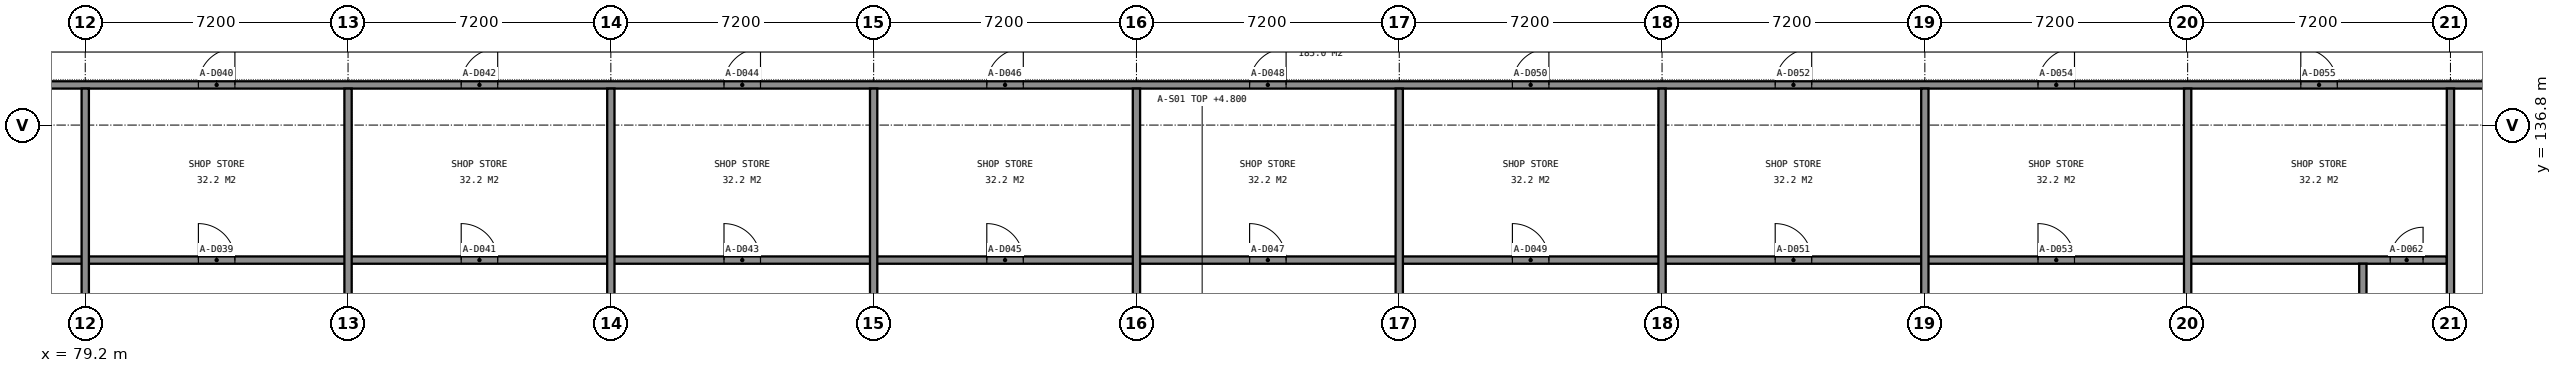
"""IFC4 building model, lengths in metres.
Left out: names, types, materials, properties, quantities, classifications, styles, units other than length and angle.
Written with IfcOpenShell. Run it as: python <this file> out.ifc"""

import sys

from ifc_helpers import new_model, si_unit, direction, frame, frame_2d, origin, place, context, subcontext, project, spatial, rectangle, extrude, element, fill, save


model = new_model("IFC4")
c1 = context("Model", 3, precision=1e-05, world=origin(), true_north=direction((0.0, 1.0)))
c2 = subcontext(c1, "Body", "Model", "MODEL_VIEW")
j1 = project(units=[si_unit("LENGTHUNIT", "METRE"), si_unit("PLANEANGLEUNIT", "RADIAN")], contexts=[c1])
p1 = place(None, origin())
s1 = spatial("IfcSite", under=j1, at=p1, CompositionType="ELEMENT")
p2 = place(p1, origin())
s2 = spatial("IfcBuilding", under=s1, at=p2, CompositionType="ELEMENT")
p3 = place(p2, origin())
s3 = spatial("IfcBuildingStorey", under=s2, at=p3, CompositionType="ELEMENT", Elevation=0.0)
p4 = place(p3, frame((57.7, 133.1, 0.0), z_axis=(0.0, 0.0, 1.0), x_axis=(1.0, 0.0, 0.0)))
e1 = element("IfcWall", 1, at=p4, inside=s3, PredefinedType="PARTITIONING", context=c2, shape_type="SweptSolid", body=[
    extrude(rectangle(XDim=86.2, YDim=0.2, at=frame_2d((43.1, 0.0))), origin(), (0.0, 0.0, 1.0), 3.5),
])
p5 = place(p4, frame((3.0, 0.0, 0.0)))
e2 = element("IfcOpeningElement", 2, at=p5, cuts=e1, PredefinedType="OPENING", context=c2, shape_type="SweptSolid", body=[
    extrude(rectangle(XDim=1.0, YDim=2.1, at=frame_2d((0.5, 1.05))), frame((0.0, 0.11, 0.0), z_axis=(0.0, -1.0, 0.0), x_axis=(1.0, 0.0, 0.0)), (0.0, 0.0, 1.0), 0.22),
])
p6 = place(p4, frame((10.2, 0.0, 0.0)))
e3 = element("IfcOpeningElement", 3, at=p6, cuts=e1, PredefinedType="OPENING", context=c2, shape_type="SweptSolid", body=[
    extrude(rectangle(XDim=1.0, YDim=2.1, at=frame_2d((0.5, 1.05))), frame((0.0, 0.11, 0.0), z_axis=(0.0, -1.0, 0.0), x_axis=(1.0, 0.0, 0.0)), (0.0, 0.0, 1.0), 0.22),
])
p7 = place(p4, frame((17.4, 0.0, 0.0)))
e4 = element("IfcOpeningElement", 4, at=p7, cuts=e1, PredefinedType="OPENING", context=c2, shape_type="SweptSolid", body=[
    extrude(rectangle(XDim=1.0, YDim=2.1, at=frame_2d((0.5, 1.05))), frame((0.0, 0.11, 0.0), z_axis=(0.0, -1.0, 0.0), x_axis=(1.0, 0.0, 0.0)), (0.0, 0.0, 1.0), 0.22),
])
p8 = place(p4, frame((24.6, 0.0, 0.0)))
e5 = element("IfcOpeningElement", 5, at=p8, cuts=e1, PredefinedType="OPENING", context=c2, shape_type="SweptSolid", body=[
    extrude(rectangle(XDim=1.0, YDim=2.1, at=frame_2d((0.5, 1.05))), frame((0.0, 0.11, 0.0), z_axis=(0.0, -1.0, 0.0), x_axis=(1.0, 0.0, 0.0)), (0.0, 0.0, 1.0), 0.22),
])
p9 = place(p4, frame((31.8, 0.0, 0.0)))
e6 = element("IfcOpeningElement", 6, at=p9, cuts=e1, PredefinedType="OPENING", context=c2, shape_type="SweptSolid", body=[
    extrude(rectangle(XDim=1.0, YDim=2.1, at=frame_2d((0.5, 1.05))), frame((0.0, 0.11, 0.0), z_axis=(0.0, -1.0, 0.0), x_axis=(1.0, 0.0, 0.0)), (0.0, 0.0, 1.0), 0.22),
])
p10 = place(p4, frame((39.0, 0.0, 0.0)))
e7 = element("IfcOpeningElement", 7, at=p10, cuts=e1, PredefinedType="OPENING", context=c2, shape_type="SweptSolid", body=[
    extrude(rectangle(XDim=1.0, YDim=2.1, at=frame_2d((0.5, 1.05))), frame((0.0, 0.11, 0.0), z_axis=(0.0, -1.0, 0.0), x_axis=(1.0, 0.0, 0.0)), (0.0, 0.0, 1.0), 0.22),
])
p11 = place(p4, frame((46.2, 0.0, 0.0)))
e8 = element("IfcOpeningElement", 8, at=p11, cuts=e1, PredefinedType="OPENING", context=c2, shape_type="SweptSolid", body=[
    extrude(rectangle(XDim=1.0, YDim=2.1, at=frame_2d((0.5, 1.05))), frame((0.0, 0.11, 0.0), z_axis=(0.0, -1.0, 0.0), x_axis=(1.0, 0.0, 0.0)), (0.0, 0.0, 1.0), 0.22),
])
p12 = place(p4, frame((53.4, 0.0, 0.0)))
e9 = element("IfcOpeningElement", 9, at=p12, cuts=e1, PredefinedType="OPENING", context=c2, shape_type="SweptSolid", body=[
    extrude(rectangle(XDim=1.0, YDim=2.1, at=frame_2d((0.5, 1.05))), frame((0.0, 0.11, 0.0), z_axis=(0.0, -1.0, 0.0), x_axis=(1.0, 0.0, 0.0)), (0.0, 0.0, 1.0), 0.22),
])
p13 = place(p4, frame((60.6, 0.0, 0.0)))
e10 = element("IfcOpeningElement", 10, at=p13, cuts=e1, PredefinedType="OPENING", context=c2, shape_type="SweptSolid", body=[
    extrude(rectangle(XDim=1.0, YDim=2.1, at=frame_2d((0.5, 1.05))), frame((0.0, 0.11, 0.0), z_axis=(0.0, -1.0, 0.0), x_axis=(1.0, 0.0, 0.0)), (0.0, 0.0, 1.0), 0.22),
])
p14 = place(p4, frame((67.8, 0.0, 0.0)))
e11 = element("IfcOpeningElement", 11, at=p14, cuts=e1, PredefinedType="OPENING", context=c2, shape_type="SweptSolid", body=[
    extrude(rectangle(XDim=1.0, YDim=2.1, at=frame_2d((0.5, 1.05))), frame((0.0, 0.11, 0.0), z_axis=(0.0, -1.0, 0.0), x_axis=(1.0, 0.0, 0.0)), (0.0, 0.0, 1.0), 0.22),
])
p15 = place(p4, frame((75.0, 0.0, 0.0)))
e12 = element("IfcOpeningElement", 12, at=p15, cuts=e1, PredefinedType="OPENING", context=c2, shape_type="SweptSolid", body=[
    extrude(rectangle(XDim=1.0, YDim=2.1, at=frame_2d((0.5, 1.05))), frame((0.0, 0.11, 0.0), z_axis=(0.0, -1.0, 0.0), x_axis=(1.0, 0.0, 0.0)), (0.0, 0.0, 1.0), 0.22),
])
p16 = place(p4, frame((84.65, 0.0, 0.0)))
e13 = element("IfcOpeningElement", 13, at=p16, cuts=e1, PredefinedType="OPENING", context=c2, shape_type="SweptSolid", body=[
    extrude(rectangle(XDim=0.9, YDim=2.1, at=frame_2d((0.45, 1.05))), frame((0.0, 0.11, 0.0), z_axis=(0.0, -1.0, 0.0), x_axis=(1.0, 0.0, 0.0)), (0.0, 0.0, 1.0), 0.22),
])
p17 = place(p3, frame((54.35, 137.9, 0.0), z_axis=(0.0, 0.0, 1.0), x_axis=(1.0, 0.0, 0.0)))
e14 = element("IfcWall", 14, at=p17, inside=s3, PredefinedType="PARTITIONING", context=c2, shape_type="SweptSolid", body=[
    extrude(rectangle(XDim=92.9, YDim=0.2, at=frame_2d((46.45, 0.0))), origin(), (0.0, 0.0, 1.0), 3.5),
])
p18 = place(p17, frame((1.1, 0.0, 0.0)))
e15 = element("IfcOpeningElement", 15, at=p18, cuts=e14, PredefinedType="OPENING", context=c2, shape_type="SweptSolid", body=[
    extrude(rectangle(XDim=0.9, YDim=2.1, at=frame_2d((0.45, 1.05))), frame((0.0, 0.11, 0.0), z_axis=(0.0, -1.0, 0.0), x_axis=(1.0, 0.0, 0.0)), (0.0, 0.0, 1.0), 0.22),
])
p19 = place(p17, frame((90.9, 0.0, 0.0)))
e16 = element("IfcOpeningElement", 16, at=p19, cuts=e14, PredefinedType="OPENING", context=c2, shape_type="SweptSolid", body=[
    extrude(rectangle(XDim=0.9, YDim=2.1, at=frame_2d((0.45, 1.05))), frame((0.0, 0.11, 0.0), z_axis=(0.0, -1.0, 0.0), x_axis=(1.0, 0.0, 0.0)), (0.0, 0.0, 1.0), 0.22),
])
p20 = place(p17, frame((6.35, 0.0, 0.0)))
e17 = element("IfcOpeningElement", 17, at=p20, cuts=e14, PredefinedType="OPENING", context=c2, shape_type="SweptSolid", body=[
    extrude(rectangle(XDim=1.0, YDim=2.1, at=frame_2d((0.5, 1.05))), frame((0.0, 0.11, 0.0), z_axis=(0.0, -1.0, 0.0), x_axis=(1.0, 0.0, 0.0)), (0.0, 0.0, 1.0), 0.22),
])
p21 = place(p17, frame((13.55, 0.0, 0.0)))
e18 = element("IfcOpeningElement", 18, at=p21, cuts=e14, PredefinedType="OPENING", context=c2, shape_type="SweptSolid", body=[
    extrude(rectangle(XDim=1.0, YDim=2.1, at=frame_2d((0.5, 1.05))), frame((0.0, 0.11, 0.0), z_axis=(0.0, -1.0, 0.0), x_axis=(1.0, 0.0, 0.0)), (0.0, 0.0, 1.0), 0.22),
])
p22 = place(p17, frame((20.75, 0.0, 0.0)))
e19 = element("IfcOpeningElement", 19, at=p22, cuts=e14, PredefinedType="OPENING", context=c2, shape_type="SweptSolid", body=[
    extrude(rectangle(XDim=1.0, YDim=2.1, at=frame_2d((0.5, 1.05))), frame((0.0, 0.11, 0.0), z_axis=(0.0, -1.0, 0.0), x_axis=(1.0, 0.0, 0.0)), (0.0, 0.0, 1.0), 0.22),
])
p23 = place(p17, frame((27.95, 0.0, 0.0)))
e20 = element("IfcOpeningElement", 20, at=p23, cuts=e14, PredefinedType="OPENING", context=c2, shape_type="SweptSolid", body=[
    extrude(rectangle(XDim=1.0, YDim=2.1, at=frame_2d((0.5, 1.05))), frame((0.0, 0.11, 0.0), z_axis=(0.0, -1.0, 0.0), x_axis=(1.0, 0.0, 0.0)), (0.0, 0.0, 1.0), 0.22),
])
p24 = place(p17, frame((35.15, 0.0, 0.0)))
e21 = element("IfcOpeningElement", 21, at=p24, cuts=e14, PredefinedType="OPENING", context=c2, shape_type="SweptSolid", body=[
    extrude(rectangle(XDim=1.0, YDim=2.1, at=frame_2d((0.5, 1.05))), frame((0.0, 0.11, 0.0), z_axis=(0.0, -1.0, 0.0), x_axis=(1.0, 0.0, 0.0)), (0.0, 0.0, 1.0), 0.22),
])
p25 = place(p17, frame((42.35, 0.0, 0.0)))
e22 = element("IfcOpeningElement", 22, at=p25, cuts=e14, PredefinedType="OPENING", context=c2, shape_type="SweptSolid", body=[
    extrude(rectangle(XDim=1.0, YDim=2.1, at=frame_2d((0.5, 1.05))), frame((0.0, 0.11, 0.0), z_axis=(0.0, -1.0, 0.0), x_axis=(1.0, 0.0, 0.0)), (0.0, 0.0, 1.0), 0.22),
])
p26 = place(p17, frame((49.55, 0.0, 0.0)))
e23 = element("IfcOpeningElement", 23, at=p26, cuts=e14, PredefinedType="OPENING", context=c2, shape_type="SweptSolid", body=[
    extrude(rectangle(XDim=1.0, YDim=2.1, at=frame_2d((0.5, 1.05))), frame((0.0, 0.11, 0.0), z_axis=(0.0, -1.0, 0.0), x_axis=(1.0, 0.0, 0.0)), (0.0, 0.0, 1.0), 0.22),
])
p27 = place(p17, frame((56.75, 0.0, 0.0)))
e24 = element("IfcOpeningElement", 24, at=p27, cuts=e14, PredefinedType="OPENING", context=c2, shape_type="SweptSolid", body=[
    extrude(rectangle(XDim=1.0, YDim=2.1, at=frame_2d((0.5, 1.05))), frame((0.0, 0.11, 0.0), z_axis=(0.0, -1.0, 0.0), x_axis=(1.0, 0.0, 0.0)), (0.0, 0.0, 1.0), 0.22),
])
p28 = place(p17, frame((63.95, 0.0, 0.0)))
e25 = element("IfcOpeningElement", 25, at=p28, cuts=e14, PredefinedType="OPENING", context=c2, shape_type="SweptSolid", body=[
    extrude(rectangle(XDim=1.0, YDim=2.1, at=frame_2d((0.5, 1.05))), frame((0.0, 0.11, 0.0), z_axis=(0.0, -1.0, 0.0), x_axis=(1.0, 0.0, 0.0)), (0.0, 0.0, 1.0), 0.22),
])
p29 = place(p17, frame((71.15, 0.0, 0.0)))
e26 = element("IfcOpeningElement", 26, at=p29, cuts=e14, PredefinedType="OPENING", context=c2, shape_type="SweptSolid", body=[
    extrude(rectangle(XDim=1.0, YDim=2.1, at=frame_2d((0.5, 1.05))), frame((0.0, 0.11, 0.0), z_axis=(0.0, -1.0, 0.0), x_axis=(1.0, 0.0, 0.0)), (0.0, 0.0, 1.0), 0.22),
])
p30 = place(p17, frame((78.35, 0.0, 0.0)))
e27 = element("IfcOpeningElement", 27, at=p30, cuts=e14, PredefinedType="OPENING", context=c2, shape_type="SweptSolid", body=[
    extrude(rectangle(XDim=1.0, YDim=2.1, at=frame_2d((0.5, 1.05))), frame((0.0, 0.11, 0.0), z_axis=(0.0, -1.0, 0.0), x_axis=(1.0, 0.0, 0.0)), (0.0, 0.0, 1.0), 0.22),
])
p31 = place(p17, frame((85.55, 0.0, 0.0)))
e28 = element("IfcOpeningElement", 28, at=p31, cuts=e14, PredefinedType="OPENING", context=c2, shape_type="SweptSolid", body=[
    extrude(rectangle(XDim=1.0, YDim=2.1, at=frame_2d((0.5, 1.05))), frame((0.0, 0.11, 0.0), z_axis=(0.0, -1.0, 0.0), x_axis=(1.0, 0.0, 0.0)), (0.0, 0.0, 1.0), 0.22),
])
for number, where, z_axis, x_axis in (
    (29, (79.2, 129.85, 0.0), (0.0, 0.0, 1.0), (0.0, 1.0, 0.0)),
    (30, (86.4, 129.85, 0.0), (0.0, 0.0, 1.0), (0.0, 1.0, 0.0)),
    (31, (93.6, 129.85, 0.0), (0.0, 0.0, 1.0), (0.0, 1.0, 0.0)),
    (32, (100.8, 129.85, 0.0), (0.0, 0.0, 1.0), (0.0, 1.0, 0.0)),
    (33, (108.0, 129.85, 0.0), (0.0, 0.0, 1.0), (0.0, 1.0, 0.0)),
    (34, (115.2, 129.85, 0.0), (0.0, 0.0, 1.0), (0.0, 1.0, 0.0)),
    (35, (122.4, 129.85, 0.0), (0.0, 0.0, 1.0), (0.0, 1.0, 0.0)),
    (36, (129.6, 129.85, 0.0), (0.0, 0.0, 1.0), (0.0, 1.0, 0.0)),
    (37, (136.8, 129.85, 0.0), (0.0, 0.0, 1.0), (0.0, 1.0, 0.0)),
):
    element("IfcWall", number, at=place(p3, frame(where, z_axis=z_axis, x_axis=x_axis)), inside=s3, PredefinedType="PARTITIONING", context=c2, shape_type="SweptSolid", body=[
        extrude(rectangle(XDim=7.95, YDim=0.2, at=frame_2d((3.975, 0.0))), origin(), (0.0, 0.0, 1.0), 3.5),
    ])
p32 = place(p3, frame((141.6, 123.7, 0.0), z_axis=(0.0, 0.0, 1.0), x_axis=(0.0, 1.0, 0.0)))
e38 = element("IfcWall", 38, at=p32, inside=s3, PredefinedType="PARTITIONING", context=c2, shape_type="SweptSolid", body=[
    extrude(rectangle(XDim=9.3, YDim=0.2, at=frame_2d((4.65, 0.0))), origin(), (0.0, 0.0, 1.0), 3.5),
])
p33 = place(p3, frame((144.0, 129.85, 0.0), z_axis=(0.0, 0.0, 1.0), x_axis=(0.0, 1.0, 0.0)))
e39 = element("IfcWall", 39, at=p33, inside=s3, PredefinedType="PARTITIONING", context=c2, shape_type="SweptSolid", body=[
    extrude(rectangle(XDim=7.95, YDim=0.2, at=frame_2d((3.975, 0.0))), origin(), (0.0, 0.0, 1.0), 3.5),
])
p34 = place(p8, origin())
e40 = element("IfcDoor", 40, at=p34, inside=s3, OperationType="SINGLE_SWING_LEFT", PredefinedType="DOOR", context=c2, shape_type="SweptSolid", body=[
    extrude(rectangle(XDim=1.0, YDim=2.1, at=frame_2d((0.5, 1.05))), frame((0.0, 0.025, 0.0), z_axis=(0.0, -1.0, 0.0), x_axis=(1.0, 0.0, 0.0)), (0.0, 0.0, 1.0), 0.05),
])
fill(e5, e40)
p35 = place(p23, origin())
e41 = element("IfcDoor", 41, at=p35, inside=s3, OperationType="SINGLE_SWING_RIGHT", PredefinedType="DOOR", context=c2, shape_type="SweptSolid", body=[
    extrude(rectangle(XDim=1.0, YDim=2.1, at=frame_2d((0.5, 1.05))), frame((0.0, 0.025, 0.0), z_axis=(0.0, -1.0, 0.0), x_axis=(1.0, 0.0, 0.0)), (0.0, 0.0, 1.0), 0.05),
])
fill(e20, e41)
p36 = place(p9, origin())
e42 = element("IfcDoor", 42, at=p36, inside=s3, OperationType="SINGLE_SWING_LEFT", PredefinedType="DOOR", context=c2, shape_type="SweptSolid", body=[
    extrude(rectangle(XDim=1.0, YDim=2.1, at=frame_2d((0.5, 1.05))), frame((0.0, 0.025, 0.0), z_axis=(0.0, -1.0, 0.0), x_axis=(1.0, 0.0, 0.0)), (0.0, 0.0, 1.0), 0.05),
])
fill(e6, e42)
p37 = place(p24, origin())
e43 = element("IfcDoor", 43, at=p37, inside=s3, OperationType="SINGLE_SWING_RIGHT", PredefinedType="DOOR", context=c2, shape_type="SweptSolid", body=[
    extrude(rectangle(XDim=1.0, YDim=2.1, at=frame_2d((0.5, 1.05))), frame((0.0, 0.025, 0.0), z_axis=(0.0, -1.0, 0.0), x_axis=(1.0, 0.0, 0.0)), (0.0, 0.0, 1.0), 0.05),
])
fill(e21, e43)
p38 = place(p10, origin())
e44 = element("IfcDoor", 44, at=p38, inside=s3, OperationType="SINGLE_SWING_LEFT", PredefinedType="DOOR", context=c2, shape_type="SweptSolid", body=[
    extrude(rectangle(XDim=1.0, YDim=2.1, at=frame_2d((0.5, 1.05))), frame((0.0, 0.025, 0.0), z_axis=(0.0, -1.0, 0.0), x_axis=(1.0, 0.0, 0.0)), (0.0, 0.0, 1.0), 0.05),
])
fill(e7, e44)
p39 = place(p25, origin())
e45 = element("IfcDoor", 45, at=p39, inside=s3, OperationType="SINGLE_SWING_RIGHT", PredefinedType="DOOR", context=c2, shape_type="SweptSolid", body=[
    extrude(rectangle(XDim=1.0, YDim=2.1, at=frame_2d((0.5, 1.05))), frame((0.0, 0.025, 0.0), z_axis=(0.0, -1.0, 0.0), x_axis=(1.0, 0.0, 0.0)), (0.0, 0.0, 1.0), 0.05),
])
fill(e22, e45)
p40 = place(p11, origin())
e46 = element("IfcDoor", 46, at=p40, inside=s3, OperationType="SINGLE_SWING_LEFT", PredefinedType="DOOR", context=c2, shape_type="SweptSolid", body=[
    extrude(rectangle(XDim=1.0, YDim=2.1, at=frame_2d((0.5, 1.05))), frame((0.0, 0.025, 0.0), z_axis=(0.0, -1.0, 0.0), x_axis=(1.0, 0.0, 0.0)), (0.0, 0.0, 1.0), 0.05),
])
fill(e8, e46)
p41 = place(p26, origin())
e47 = element("IfcDoor", 47, at=p41, inside=s3, OperationType="SINGLE_SWING_RIGHT", PredefinedType="DOOR", context=c2, shape_type="SweptSolid", body=[
    extrude(rectangle(XDim=1.0, YDim=2.1, at=frame_2d((0.5, 1.05))), frame((0.0, 0.025, 0.0), z_axis=(0.0, -1.0, 0.0), x_axis=(1.0, 0.0, 0.0)), (0.0, 0.0, 1.0), 0.05),
])
fill(e23, e47)
p42 = place(p12, origin())
e48 = element("IfcDoor", 48, at=p42, inside=s3, OperationType="SINGLE_SWING_LEFT", PredefinedType="DOOR", context=c2, shape_type="SweptSolid", body=[
    extrude(rectangle(XDim=1.0, YDim=2.1, at=frame_2d((0.5, 1.05))), frame((0.0, 0.025, 0.0), z_axis=(0.0, -1.0, 0.0), x_axis=(1.0, 0.0, 0.0)), (0.0, 0.0, 1.0), 0.05),
])
fill(e9, e48)
p43 = place(p27, origin())
e49 = element("IfcDoor", 49, at=p43, inside=s3, OperationType="SINGLE_SWING_RIGHT", PredefinedType="DOOR", context=c2, shape_type="SweptSolid", body=[
    extrude(rectangle(XDim=1.0, YDim=2.1, at=frame_2d((0.5, 1.05))), frame((0.0, 0.025, 0.0), z_axis=(0.0, -1.0, 0.0), x_axis=(1.0, 0.0, 0.0)), (0.0, 0.0, 1.0), 0.05),
])
fill(e24, e49)
p44 = place(p13, origin())
e50 = element("IfcDoor", 50, at=p44, inside=s3, OperationType="SINGLE_SWING_LEFT", PredefinedType="DOOR", context=c2, shape_type="SweptSolid", body=[
    extrude(rectangle(XDim=1.0, YDim=2.1, at=frame_2d((0.5, 1.05))), frame((0.0, 0.025, 0.0), z_axis=(0.0, -1.0, 0.0), x_axis=(1.0, 0.0, 0.0)), (0.0, 0.0, 1.0), 0.05),
])
fill(e10, e50)
p45 = place(p28, origin())
e51 = element("IfcDoor", 51, at=p45, inside=s3, OperationType="SINGLE_SWING_RIGHT", PredefinedType="DOOR", context=c2, shape_type="SweptSolid", body=[
    extrude(rectangle(XDim=1.0, YDim=2.1, at=frame_2d((0.5, 1.05))), frame((0.0, 0.025, 0.0), z_axis=(0.0, -1.0, 0.0), x_axis=(1.0, 0.0, 0.0)), (0.0, 0.0, 1.0), 0.05),
])
fill(e25, e51)
p46 = place(p14, origin())
e52 = element("IfcDoor", 52, at=p46, inside=s3, OperationType="SINGLE_SWING_LEFT", PredefinedType="DOOR", context=c2, shape_type="SweptSolid", body=[
    extrude(rectangle(XDim=1.0, YDim=2.1, at=frame_2d((0.5, 1.05))), frame((0.0, 0.025, 0.0), z_axis=(0.0, -1.0, 0.0), x_axis=(1.0, 0.0, 0.0)), (0.0, 0.0, 1.0), 0.05),
])
fill(e11, e52)
p47 = place(p29, origin())
e53 = element("IfcDoor", 53, at=p47, inside=s3, OperationType="SINGLE_SWING_RIGHT", PredefinedType="DOOR", context=c2, shape_type="SweptSolid", body=[
    extrude(rectangle(XDim=1.0, YDim=2.1, at=frame_2d((0.5, 1.05))), frame((0.0, 0.025, 0.0), z_axis=(0.0, -1.0, 0.0), x_axis=(1.0, 0.0, 0.0)), (0.0, 0.0, 1.0), 0.05),
])
fill(e26, e53)
p48 = place(p15, origin())
e54 = element("IfcDoor", 54, at=p48, inside=s3, OperationType="SINGLE_SWING_LEFT", PredefinedType="DOOR", context=c2, shape_type="SweptSolid", body=[
    extrude(rectangle(XDim=1.0, YDim=2.1, at=frame_2d((0.5, 1.05))), frame((0.0, 0.025, 0.0), z_axis=(0.0, -1.0, 0.0), x_axis=(1.0, 0.0, 0.0)), (0.0, 0.0, 1.0), 0.05),
])
fill(e12, e54)
p49 = place(p30, origin())
e55 = element("IfcDoor", 55, at=p49, inside=s3, OperationType="SINGLE_SWING_RIGHT", PredefinedType="DOOR", context=c2, shape_type="SweptSolid", body=[
    extrude(rectangle(XDim=1.0, YDim=2.1, at=frame_2d((0.5, 1.05))), frame((0.0, 0.025, 0.0), z_axis=(0.0, -1.0, 0.0), x_axis=(1.0, 0.0, 0.0)), (0.0, 0.0, 1.0), 0.05),
])
fill(e27, e55)
p50 = place(p31, origin())
e56 = element("IfcDoor", 56, at=p50, inside=s3, OperationType="SINGLE_SWING_LEFT", PredefinedType="DOOR", context=c2, shape_type="SweptSolid", body=[
    extrude(rectangle(XDim=1.0, YDim=2.1, at=frame_2d((0.5, 1.05))), frame((0.0, 0.025, 0.0), z_axis=(0.0, -1.0, 0.0), x_axis=(1.0, 0.0, 0.0)), (0.0, 0.0, 1.0), 0.05),
])
fill(e28, e56)
p51 = place(p16, origin())
e57 = element("IfcDoor", 57, at=p51, inside=s3, OperationType="SINGLE_SWING_RIGHT", PredefinedType="DOOR", context=c2, shape_type="SweptSolid", body=[
    extrude(rectangle(XDim=0.9, YDim=2.1, at=frame_2d((0.45, 1.05))), frame((0.0, 0.025, 0.0), z_axis=(0.0, -1.0, 0.0), x_axis=(1.0, 0.0, 0.0)), (0.0, 0.0, 1.0), 0.05),
])
fill(e13, e57)
save(model, sys.argv[1])
